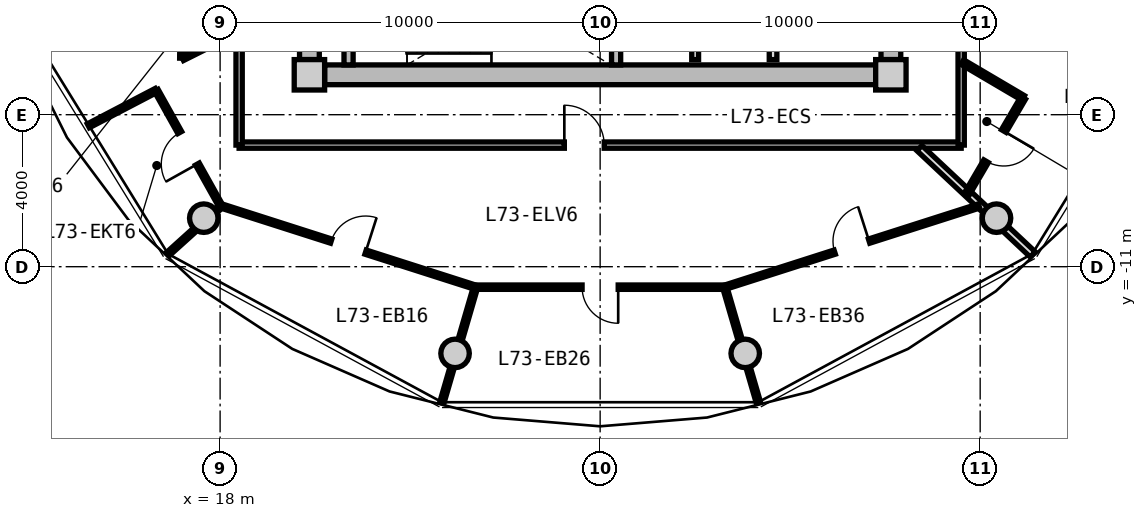
"""IFC4 building model, lengths in metres.
Left out: names, types, materials, properties, quantities, classifications, styles, units other than length and angle.
Written with IfcOpenShell. Run it as: python <this file> out.ifc"""

import sys

from ifc_helpers import new_model, si_unit, direction, frame, frame_2d, origin, origin_2d, place, context, subcontext, project, spatial, rectangle, circle, extrude, source, transform, mapped, element, fill, save


model = new_model("IFC4")
c1 = context("Model", 3, precision=1e-05, world=origin(), true_north=direction((0.0, 1.0)))
c2 = subcontext(c1, "Body", "Model", "MODEL_VIEW")
j1 = project(units=[si_unit("LENGTHUNIT", "METRE"), si_unit("PLANEANGLEUNIT", "RADIAN")], contexts=[c1])
p1 = place(None, origin())
s1 = spatial("IfcSite", under=j1, at=p1, CompositionType="ELEMENT")
p2 = place(p1, origin())
s2 = spatial("IfcBuilding", under=s1, at=p2, CompositionType="ELEMENT")
p3 = place(p2, frame((0.0, 0.0, 235.25)))
s3 = spatial("IfcBuildingStorey", under=s2, at=p3, CompositionType="ELEMENT", Elevation=235.25)
m1 = source(origin(), c2, "Body", "SweptSolid", [
    extrude(rectangle(XDim=0.8, YDim=0.8, at=origin_2d()), origin(), (0.0, 0.0, 1.0), 3.05),
])
for number, where, z_axis, x_axis in (
    (1, (20.35, -5.95, 0.0), (0.0, 0.0, 1.0), (1.0, 0.0, 0.0)),
    (2, (35.65, -5.95, 0.0), (0.0, 0.0, 1.0), (1.0, 0.0, 0.0)),
):
    element("IfcColumn", number, at=place(p3, frame(where, z_axis=z_axis, x_axis=x_axis)), inside=s3, PredefinedType="COLUMN", context=c2, shape_type="MappedRepresentation", body=[
        mapped(m1, transform((0.0, 0.0, 0.0), x_axis=(1.0, 0.0, 0.0), y_axis=(0.0, 1.0, 0.0), z_axis=(0.0, 0.0, 1.0), scale=1.0)),
    ])
m2 = source(origin(), c2, "Body", "SweptSolid", [
    extrude(rectangle(XDim=14.5, YDim=0.52, at=frame_2d((7.25, 0.0))), origin(), (0.0, 0.0, 1.0), 2.81),
])
p4 = place(p3, frame((35.25, -5.95, 0.0), z_axis=(0.0, 0.0, 1.0), x_axis=(-1.0, 0.0, 0.0)))
e3 = element("IfcWall", 3, at=p4, inside=s3, PredefinedType="SHEAR", context=c2, shape_type="MappedRepresentation", body=[
    mapped(m2, transform((0.0, 0.0, 0.0), x_axis=(1.0, 0.0, 0.0), y_axis=(0.0, 1.0, 0.0), z_axis=(0.0, 0.0, 1.0), scale=1.0)),
])
m3 = source(origin(), c2, "Body", "SweptSolid", [
    extrude(rectangle(XDim=11.1, YDim=0.52, at=frame_2d((5.55, 0.0))), origin(), (0.0, 0.0, 1.0), 2.81),
])
p5 = place(p3, frame((20.35, -5.55, 0.0), z_axis=(0.0, 0.0, 1.0), x_axis=(0.0, 1.0, 0.0)))
e4 = element("IfcWall", 4, at=p5, inside=s3, PredefinedType="SHEAR", context=c2, shape_type="MappedRepresentation", body=[
    mapped(m3, transform((0.0, 0.0, 0.0), x_axis=(1.0, 0.0, 0.0), y_axis=(0.0, 1.0, 0.0), z_axis=(0.0, 0.0, 1.0), scale=1.0)),
])
p6 = place(p5, frame((3.8, 0.0, 0.0)))
e5 = element("IfcOpeningElement", 5, at=p6, cuts=e4, PredefinedType="OPENING", context=c2, shape_type="SweptSolid", body=[
    extrude(rectangle(XDim=1.2, YDim=2.15, at=frame_2d((0.6, 1.075))), frame((0.0, 0.27, 0.0), z_axis=(0.0, -1.0, 0.0), x_axis=(1.0, 0.0, 0.0)), (0.0, 0.0, 1.0), 0.54),
])
p7 = place(p3, frame((35.65, 5.55, 0.0), z_axis=(0.0, 0.0, 1.0), x_axis=(0.0, -1.0, 0.0)))
e6 = element("IfcWall", 6, at=p7, inside=s3, PredefinedType="SHEAR", context=c2, shape_type="MappedRepresentation", body=[
    mapped(m3, transform((0.0, 0.0, 0.0), x_axis=(1.0, 0.0, 0.0), y_axis=(0.0, 1.0, 0.0), z_axis=(0.0, 0.0, 1.0), scale=1.0)),
])
p8 = place(p7, frame((5.65, 0.0, 0.0)))
e7 = element("IfcOpeningElement", 7, at=p8, cuts=e6, PredefinedType="OPENING", context=c2, shape_type="SweptSolid", body=[
    extrude(rectangle(XDim=1.2, YDim=2.15, at=frame_2d((0.6, 1.075))), frame((0.0, 0.27, 0.0), z_axis=(0.0, -1.0, 0.0), x_axis=(1.0, 0.0, 0.0)), (0.0, 0.0, 1.0), 0.54),
])
m4 = source(origin(), c2, "Body", "SweptSolid", [
    extrude(circle(Radius=0.375, at=origin_2d()), origin(), (0.0, 0.0, 1.0), 3.05),
])
for number, where, z_axis, x_axis in (
    (8, (17.57, -9.723, 0.0), (0.0, 0.0, 1.0), (1.0, 0.0, 0.0)),
    (9, (24.182, -13.281, 0.0), (0.0, 0.0, 1.0), (1.0, 0.0, 0.0)),
    (10, (31.818, -13.281, 0.0), (0.0, 0.0, 1.0), (1.0, 0.0, 0.0)),
    (11, (38.43, -9.723, 0.0), (0.0, 0.0, 1.0), (1.0, 0.0, 0.0)),
):
    element("IfcColumn", number, at=place(p3, frame(where, z_axis=z_axis, x_axis=x_axis)), inside=s3, PredefinedType="COLUMN", context=c2, shape_type="MappedRepresentation", body=[
        mapped(m4, transform((0.0, 0.0, 0.0), x_axis=(1.0, 0.0, 0.0), y_axis=(0.0, 1.0, 0.0), z_axis=(0.0, 0.0, 1.0), scale=1.0)),
    ])
m5 = source(origin(), c2, "Body", "SweptSolid", [
    extrude(rectangle(XDim=3.24, YDim=0.24, at=frame_2d((1.62, 0.0))), origin(), (0.0, 0.0, 1.0), 2.81),
])
for number, where, z_axis, x_axis in (
    (12, (21.38, -5.69, 0.0), (0.0, 0.0, 1.0), (0.0, 1.0, 0.0)),
    (13, (28.42, -5.69, 0.0), (0.0, 0.0, 1.0), (0.0, 1.0, 0.0)),
):
    element("IfcWall", number, at=place(p3, frame(where, z_axis=z_axis, x_axis=x_axis)), inside=s3, PredefinedType="PARTITIONING", context=c2, shape_type="MappedRepresentation", body=[
        mapped(m5, transform((0.0, 0.0, 0.0), x_axis=(1.0, 0.0, 0.0), y_axis=(0.0, 1.0, 0.0), z_axis=(0.0, 0.0, 1.0), scale=1.0)),
    ])
m6 = source(origin(), c2, "Body", "SweptSolid", [
    extrude(rectangle(XDim=3.8, YDim=0.2, at=frame_2d((1.9, 0.0))), origin(), (0.0, 0.0, 1.0), 2.795),
])
p9 = place(p3, frame((32.55, -5.55, 0.0), z_axis=(0.0, 0.0, 1.0), x_axis=(0.0, 1.0, 0.0)))
e14 = element("IfcWall", 14, at=p9, inside=s3, PredefinedType="PARTITIONING", context=c2, shape_type="MappedRepresentation", body=[
    mapped(m6, transform((0.0, 0.0, 0.0), x_axis=(1.0, 0.0, 0.0), y_axis=(0.0, 1.0, 0.0), z_axis=(0.0, 0.0, 1.0), scale=1.0)),
])
m7 = source(origin(), c2, "Body", "SweptSolid", [
    extrude(rectangle(XDim=4.2, YDim=0.18, at=frame_2d((2.1, 0.0))), origin(), (0.0, 0.0, 1.0), 2.795),
])
p10 = place(p3, frame((30.5, -5.55, 0.0), z_axis=(0.0, 0.0, 1.0), x_axis=(0.0, 1.0, 0.0)))
e15 = element("IfcWall", 15, at=p10, inside=s3, PredefinedType="PARTITIONING", context=c2, shape_type="MappedRepresentation", body=[
    mapped(m7, transform((0.0, 0.0, 0.0), x_axis=(1.0, 0.0, 0.0), y_axis=(0.0, 1.0, 0.0), z_axis=(0.0, 0.0, 1.0), scale=1.0)),
])
m8 = source(origin(), c2, "Body", "SweptSolid", [
    extrude(rectangle(XDim=19.0, YDim=0.165, at=frame_2d((9.5, 0.0))), origin(), (0.0, 0.0, 1.0), 2.795),
])
p11 = place(p3, frame((37.5, -7.8, 0.0), z_axis=(0.0, 0.0, 1.0), x_axis=(-1.0, 0.0, 0.0)))
e16 = element("IfcWall", 16, at=p11, inside=s3, PredefinedType="PARTITIONING", context=c2, shape_type="MappedRepresentation", body=[
    mapped(m8, transform((0.0, 0.0, 0.0), x_axis=(1.0, 0.0, 0.0), y_axis=(0.0, 1.0, 0.0), z_axis=(0.0, 0.0, 1.0), scale=1.0)),
])
p12 = place(p11, frame((9.392, 0.0, 0.0)))
e17 = element("IfcOpeningElement", 17, at=p12, cuts=e16, PredefinedType="OPENING", context=c2, shape_type="SweptSolid", body=[
    extrude(rectangle(XDim=1.05, YDim=2.15, at=frame_2d((0.525, 1.075))), frame((0.0, 0.093, 0.0), z_axis=(0.0, -1.0, 0.0), x_axis=(1.0, 0.0, 0.0)), (0.0, 0.0, 1.0), 0.185),
])
m9 = source(origin(), c2, "Body", "SweptSolid", [
    extrude(rectangle(XDim=6.88, YDim=0.165, at=frame_2d((3.44, 0.0))), origin(), (0.0, 0.0, 1.0), 2.795),
])
p13 = place(p3, frame((18.5, -7.8, 0.0), z_axis=(0.0, 0.0, 1.0), x_axis=(0.0, 1.0, 0.0)))
e18 = element("IfcWall", 18, at=p13, inside=s3, PredefinedType="PARTITIONING", context=c2, shape_type="MappedRepresentation", body=[
    mapped(m9, transform((0.0, 0.0, 0.0), x_axis=(1.0, 0.0, 0.0), y_axis=(0.0, 1.0, 0.0), z_axis=(0.0, 0.0, 1.0), scale=1.0)),
])
p14 = place(p3, frame((37.5, -0.92, 0.0), z_axis=(0.0, 0.0, 1.0), x_axis=(0.0, -1.0, 0.0)))
e19 = element("IfcWall", 19, at=p14, inside=s3, PredefinedType="PARTITIONING", context=c2, shape_type="MappedRepresentation", body=[
    mapped(m9, transform((0.0, 0.0, 0.0), x_axis=(1.0, 0.0, 0.0), y_axis=(0.0, 1.0, 0.0), z_axis=(0.0, 0.0, 1.0), scale=1.0)),
])
p15 = place(p14, frame((2.586, 0.0, 0.0)))
e20 = element("IfcOpeningElement", 20, at=p15, cuts=e19, PredefinedType="OPENING", context=c2, shape_type="SweptSolid", body=[
    extrude(rectangle(XDim=1.05, YDim=2.15, at=frame_2d((0.525, 1.075))), frame((0.0, 0.093, 0.0), z_axis=(0.0, -1.0, 0.0), x_axis=(1.0, 0.0, 0.0)), (0.0, 0.0, 1.0), 0.185),
])
m10 = source(origin(), c2, "Body", "SweptSolid", [
    extrude(rectangle(XDim=4.089, YDim=0.19, at=frame_2d((2.044, 0.0))), origin(), (0.0, 0.0, 1.0), 2.395),
])
p16 = place(p3, frame((36.402, -7.88, 0.0), z_axis=(0.0, 0.0, 1.0), x_axis=(0.729401273609, -0.684086092577, 0.0)))
e21 = element("IfcWall", 21, at=p16, inside=s3, PredefinedType="PARTITIONING", context=c2, shape_type="MappedRepresentation", body=[
    mapped(m10, transform((0.0, 0.0, 0.0), x_axis=(1.0, 0.0, 0.0), y_axis=(0.0, 1.0, 0.0), z_axis=(0.0, 0.0, 1.0), scale=1.0)),
])
m11 = source(origin(), c2, "Body", "SweptSolid", [
    extrude(rectangle(XDim=7.024, YDim=0.115, at=frame_2d((3.512, 0.0))), origin(), (0.0, 0.0, 1.0), 2.795),
])
p17 = place(p3, frame((18.03, -9.401, 0.0), z_axis=(0.0, 0.0, 1.0), x_axis=(0.952454006655, -0.304682400552, 0.0)))
e22 = element("IfcWall", 22, at=p17, inside=s3, PredefinedType="PARTITIONING", context=c2, shape_type="MappedRepresentation", body=[
    mapped(m11, transform((0.0, 0.0, 0.0), x_axis=(1.0, 0.0, 0.0), y_axis=(0.0, 1.0, 0.0), z_axis=(0.0, 0.0, 1.0), scale=1.0)),
])
p18 = place(p17, frame((3.037, 0.0, 0.0)))
e23 = element("IfcOpeningElement", 23, at=p18, cuts=e22, PredefinedType="OPENING", context=c2, shape_type="SweptSolid", body=[
    extrude(rectangle(XDim=0.95, YDim=2.1, at=frame_2d((0.475, 1.05))), frame((0.0, 0.067, 0.0), z_axis=(0.0, -1.0, 0.0), x_axis=(1.0, 0.0, 0.0)), (0.0, 0.0, 1.0), 0.135),
])
m12 = source(origin(), c2, "Body", "SweptSolid", [
    extrude(rectangle(XDim=1.905, YDim=0.115, at=frame_2d((0.953, 0.0))), origin(), (0.0, 0.0, 1.0), 2.395),
])
p19 = place(p3, frame((18.03, -9.401, 0.0), z_axis=(0.0, 0.0, 1.0), x_axis=(-0.742624708137, -0.669707804094, 0.0)))
e24 = element("IfcWall", 24, at=p19, inside=s3, PredefinedType="PARTITIONING", context=c2, shape_type="MappedRepresentation", body=[
    mapped(m12, transform((0.0, 0.0, 0.0), x_axis=(1.0, 0.0, 0.0), y_axis=(0.0, 1.0, 0.0), z_axis=(0.0, 0.0, 1.0), scale=1.0)),
])
m13 = source(origin(), c2, "Body", "SweptSolid", [
    extrude(rectangle(XDim=6.558, YDim=0.115, at=frame_2d((3.279, 0.0))), origin(), (0.0, 0.0, 1.0), 2.795),
])
p20 = place(p3, frame((24.721, -11.539, 0.0), z_axis=(0.0, 0.0, 1.0), x_axis=(1.0, 0.0, 0.0)))
e25 = element("IfcWall", 25, at=p20, inside=s3, PredefinedType="PARTITIONING", context=c2, shape_type="MappedRepresentation", body=[
    mapped(m13, transform((0.0, 0.0, 0.0), x_axis=(1.0, 0.0, 0.0), y_axis=(0.0, 1.0, 0.0), z_axis=(0.0, 0.0, 1.0), scale=1.0)),
])
p21 = place(p20, frame((2.804, 0.0, 0.0)))
e26 = element("IfcOpeningElement", 26, at=p21, cuts=e25, PredefinedType="OPENING", context=c2, shape_type="SweptSolid", body=[
    extrude(rectangle(XDim=0.95, YDim=2.1, at=frame_2d((0.475, 1.05))), frame((0.0, 0.067, 0.0), z_axis=(0.0, -1.0, 0.0), x_axis=(1.0, 0.0, 0.0)), (0.0, 0.0, 1.0), 0.135),
])
m14 = source(origin(), c2, "Body", "SweptSolid", [
    extrude(rectangle(XDim=3.173, YDim=0.115, at=frame_2d((1.587, 0.0))), origin(), (0.0, 0.0, 1.0), 2.395),
])
p22 = place(p3, frame((24.721, -11.539, 0.0), z_axis=(0.0, 0.0, 1.0), x_axis=(-0.279878875918, -0.960035319566, 0.0)))
e27 = element("IfcWall", 27, at=p22, inside=s3, PredefinedType="PARTITIONING", context=c2, shape_type="MappedRepresentation", body=[
    mapped(m14, transform((0.0, 0.0, 0.0), x_axis=(1.0, 0.0, 0.0), y_axis=(0.0, 1.0, 0.0), z_axis=(0.0, 0.0, 1.0), scale=1.0)),
])
p23 = place(p3, frame((31.28, -11.542, 0.0), z_axis=(0.0, 0.0, 1.0), x_axis=(0.952454006655, 0.304682400552, 0.0)))
e28 = element("IfcWall", 28, at=p23, inside=s3, PredefinedType="PARTITIONING", context=c2, shape_type="MappedRepresentation", body=[
    mapped(m11, transform((0.0, 0.0, 0.0), x_axis=(1.0, 0.0, 0.0), y_axis=(0.0, 1.0, 0.0), z_axis=(0.0, 0.0, 1.0), scale=1.0)),
])
p24 = place(p23, frame((3.037, 0.0, 0.0)))
e29 = element("IfcOpeningElement", 29, at=p24, cuts=e28, PredefinedType="OPENING", context=c2, shape_type="SweptSolid", body=[
    extrude(rectangle(XDim=0.95, YDim=2.1, at=frame_2d((0.475, 1.05))), frame((0.0, 0.067, 0.0), z_axis=(0.0, -1.0, 0.0), x_axis=(1.0, 0.0, 0.0)), (0.0, 0.0, 1.0), 0.135),
])
m15 = source(origin(), c2, "Body", "SweptSolid", [
    extrude(rectangle(XDim=3.171, YDim=0.115, at=frame_2d((1.585, 0.0))), origin(), (0.0, 0.0, 1.0), 2.395),
])
p25 = place(p3, frame((31.28, -11.542, 0.0), z_axis=(0.0, 0.0, 1.0), x_axis=(0.279893554029, -0.960031040338, 0.0)))
e30 = element("IfcWall", 30, at=p25, inside=s3, PredefinedType="PARTITIONING", context=c2, shape_type="MappedRepresentation", body=[
    mapped(m15, transform((0.0, 0.0, 0.0), x_axis=(1.0, 0.0, 0.0), y_axis=(0.0, 1.0, 0.0), z_axis=(0.0, 0.0, 1.0), scale=1.0)),
])
m16 = source(origin(), c2, "Body", "SweptSolid", [
    extrude(rectangle(XDim=1.638, YDim=0.14, at=frame_2d((0.819, 0.0))), origin(), (0.0, 0.0, 1.0), 2.795),
])
p26 = place(p3, frame((18.47, -4.778, 0.0), z_axis=(0.0, 0.0, 1.0), x_axis=(-0.893919977945, -0.448226586707, 0.0)))
e31 = element("IfcWall", 31, at=p26, inside=s3, PredefinedType="PARTITIONING", context=c2, shape_type="MappedRepresentation", body=[
    mapped(m16, transform((0.0, 0.0, 0.0), x_axis=(1.0, 0.0, 0.0), y_axis=(0.0, 1.0, 0.0), z_axis=(0.0, 0.0, 1.0), scale=1.0)),
])
m17 = source(origin(), c2, "Body", "SweptSolid", [
    extrude(rectangle(XDim=2.759, YDim=0.14, at=frame_2d((1.379, 0.0))), origin(), (0.0, 0.0, 1.0), 2.795),
])
p27 = place(p3, frame((17.005, -5.513, 0.0), z_axis=(0.0, 0.0, 1.0), x_axis=(0.01194710728, 0.999928630767, 0.0)))
e32 = element("IfcWall", 32, at=p27, inside=s3, PredefinedType="PARTITIONING", context=c2, shape_type="MappedRepresentation", body=[
    mapped(m17, transform((0.0, 0.0, 0.0), x_axis=(1.0, 0.0, 0.0), y_axis=(0.0, 1.0, 0.0), z_axis=(0.0, 0.0, 1.0), scale=1.0)),
])
p28 = place(p27, frame((0.919, 0.0, 0.0)))
e33 = element("IfcOpeningElement", 33, at=p28, cuts=e32, PredefinedType="OPENING", context=c2, shape_type="SweptSolid", body=[
    extrude(rectangle(XDim=0.92, YDim=2.1, at=frame_2d((0.46, 1.05))), frame((0.0, 0.08, 0.0), z_axis=(0.0, -1.0, 0.0), x_axis=(1.0, 0.0, 0.0)), (0.0, 0.0, 1.0), 0.16),
])
m18 = source(origin(), c2, "Body", "SweptSolid", [
    extrude(rectangle(XDim=2.015, YDim=0.115, at=frame_2d((1.007, 0.0))), origin(), (0.0, 0.0, 1.0), 2.795),
])
p29 = place(p3, frame((16.318, -6.36, 0.0), z_axis=(0.0, 0.0, 1.0), x_axis=(-0.886437892009, -0.462847559797, 0.0)))
e34 = element("IfcWall", 34, at=p29, inside=s3, PredefinedType="PARTITIONING", context=c2, shape_type="MappedRepresentation", body=[
    mapped(m18, transform((0.0, 0.0, 0.0), x_axis=(1.0, 0.0, 0.0), y_axis=(0.0, 1.0, 0.0), z_axis=(0.0, 0.0, 1.0), scale=1.0)),
])
m19 = source(origin(), c2, "Body", "SweptSolid", [
    extrude(rectangle(XDim=3.493, YDim=0.115, at=frame_2d((1.746, 0.0))), origin(), (0.0, 0.0, 1.0), 2.795),
])
p30 = place(p3, frame((16.318, -6.36, 0.0), z_axis=(0.0, 0.0, 1.0), x_axis=(0.487896553961, -0.872901456427, 0.0)))
e35 = element("IfcWall", 35, at=p30, inside=s3, PredefinedType="PARTITIONING", context=c2, shape_type="MappedRepresentation", body=[
    mapped(m19, transform((0.0, 0.0, 0.0), x_axis=(1.0, 0.0, 0.0), y_axis=(0.0, 1.0, 0.0), z_axis=(0.0, 0.0, 1.0), scale=1.0)),
])
p31 = place(p30, frame((1.271, 0.0, 0.0)))
e36 = element("IfcOpeningElement", 36, at=p31, cuts=e35, PredefinedType="OPENING", context=c2, shape_type="SweptSolid", body=[
    extrude(rectangle(XDim=0.95, YDim=2.1, at=frame_2d((0.475, 1.05))), frame((0.0, 0.067, 0.0), z_axis=(0.0, -1.0, 0.0), x_axis=(1.0, 0.0, 0.0)), (0.0, 0.0, 1.0), 0.135),
])
m20 = source(origin(), c2, "Body", "SweptSolid", [
    extrude(rectangle(XDim=1.859, YDim=0.14, at=frame_2d((0.93, 0.0))), origin(), (0.0, 0.0, 1.0), 2.795),
])
p32 = place(p3, frame((37.53, -5.615, 0.0), z_axis=(0.0, 0.0, 1.0), x_axis=(0.861555897139, -0.507662718845, 0.0)))
e37 = element("IfcWall", 37, at=p32, inside=s3, PredefinedType="PARTITIONING", context=c2, shape_type="MappedRepresentation", body=[
    mapped(m20, transform((0.0, 0.0, 0.0), x_axis=(1.0, 0.0, 0.0), y_axis=(0.0, 1.0, 0.0), z_axis=(0.0, 0.0, 1.0), scale=1.0)),
])
m21 = source(origin(), c2, "Body", "SweptSolid", [
    extrude(rectangle(XDim=2.939, YDim=0.14, at=frame_2d((1.47, 0.0))), origin(), (0.0, 0.0, 1.0), 2.795),
])
p33 = place(p3, frame((39.132, -6.559, 0.0), z_axis=(0.0, 0.0, 1.0), x_axis=(-0.505883614636, -0.862601743821, 0.0)))
e38 = element("IfcWall", 38, at=p33, inside=s3, PredefinedType="PARTITIONING", context=c2, shape_type="MappedRepresentation", body=[
    mapped(m21, transform((0.0, 0.0, 0.0), x_axis=(1.0, 0.0, 0.0), y_axis=(0.0, 1.0, 0.0), z_axis=(0.0, 0.0, 1.0), scale=1.0)),
])
p34 = place(p33, frame((1.01, 0.0, 0.0)))
e39 = element("IfcOpeningElement", 39, at=p34, cuts=e38, PredefinedType="OPENING", context=c2, shape_type="SweptSolid", body=[
    extrude(rectangle(XDim=0.92, YDim=2.1, at=frame_2d((0.46, 1.05))), frame((0.0, 0.08, 0.0), z_axis=(0.0, -1.0, 0.0), x_axis=(1.0, 0.0, 0.0)), (0.0, 0.0, 1.0), 0.16),
])
m22 = source(origin(), c2, "Body", "SweptSolid", [
    extrude(rectangle(XDim=1.05, YDim=2.15, at=frame_2d((0.525, 1.075))), frame((0.0, 0.025, 0.0), z_axis=(0.0, -1.0, 0.0), x_axis=(1.0, 0.0, 0.0)), (0.0, 0.0, 1.0), 0.05),
])
p35 = place(p12, frame((1.05, 0.0, 0.0), z_axis=(0.0, 0.0, 1.0), x_axis=(-1.0, 0.0, 0.0)))
e40 = element("IfcDoor", 40, at=p35, inside=s3, OperationType="SINGLE_SWING_LEFT", PredefinedType="DOOR", context=c2, shape_type="MappedRepresentation", body=[
    mapped(m22, transform((0.0, 0.0, 0.0), x_axis=(1.0, 0.0, 0.0), y_axis=(0.0, 1.0, 0.0), z_axis=(0.0, 0.0, 1.0), scale=1.0)),
])
fill(e17, e40)
m23 = source(origin(), c2, "Body", "SweptSolid", [
    extrude(rectangle(XDim=0.95, YDim=2.1, at=frame_2d((0.475, 1.05))), frame((0.0, 0.025, 0.0), z_axis=(0.0, -1.0, 0.0), x_axis=(1.0, 0.0, 0.0)), (0.0, 0.0, 1.0), 0.05),
])
p36 = place(p31, frame((0.95, 0.0, 0.0), z_axis=(0.0, 0.0, 1.0), x_axis=(-1.0, 0.0, 0.0)))
e41 = element("IfcDoor", 41, at=p36, inside=s3, OperationType="SINGLE_SWING_LEFT", PredefinedType="DOOR", context=c2, shape_type="MappedRepresentation", body=[
    mapped(m23, transform((0.0, 0.0, 0.0), x_axis=(1.0, 0.0, 0.0), y_axis=(0.0, 1.0, 0.0), z_axis=(0.0, 0.0, 1.0), scale=1.0)),
])
fill(e36, e41)
p37 = place(p18, origin())
e42 = element("IfcDoor", 42, at=p37, inside=s3, OperationType="SINGLE_SWING_RIGHT", PredefinedType="DOOR", context=c2, shape_type="MappedRepresentation", body=[
    mapped(m23, transform((0.0, 0.0, 0.0), x_axis=(1.0, 0.0, 0.0), y_axis=(0.0, 1.0, 0.0), z_axis=(0.0, 0.0, 1.0), scale=1.0)),
])
fill(e23, e42)
p38 = place(p21, frame((0.95, 0.0, 0.0), z_axis=(0.0, 0.0, 1.0), x_axis=(-1.0, 0.0, 0.0)))
e43 = element("IfcDoor", 43, at=p38, inside=s3, OperationType="SINGLE_SWING_LEFT", PredefinedType="DOOR", context=c2, shape_type="MappedRepresentation", body=[
    mapped(m23, transform((0.0, 0.0, 0.0), x_axis=(1.0, 0.0, 0.0), y_axis=(0.0, 1.0, 0.0), z_axis=(0.0, 0.0, 1.0), scale=1.0)),
])
fill(e26, e43)
p39 = place(p24, origin())
e44 = element("IfcDoor", 44, at=p39, inside=s3, OperationType="SINGLE_SWING_RIGHT", PredefinedType="DOOR", context=c2, shape_type="MappedRepresentation", body=[
    mapped(m23, transform((0.0, 0.0, 0.0), x_axis=(1.0, 0.0, 0.0), y_axis=(0.0, 1.0, 0.0), z_axis=(0.0, 0.0, 1.0), scale=1.0)),
])
fill(e29, e44)
m24 = source(origin(), c2, "Body", "SweptSolid", [
    extrude(rectangle(XDim=0.92, YDim=2.1, at=frame_2d((0.46, 1.05))), frame((0.0, 0.025, 0.0), z_axis=(0.0, -1.0, 0.0), x_axis=(1.0, 0.0, 0.0)), (0.0, 0.0, 1.0), 0.05),
])
p40 = place(p34, origin())
e45 = element("IfcDoor", 45, at=p40, inside=s3, OperationType="SINGLE_SWING_LEFT", PredefinedType="DOOR", context=c2, shape_type="MappedRepresentation", body=[
    mapped(m24, transform((0.0, 0.0, 0.0), x_axis=(1.0, 0.0, 0.0), y_axis=(0.0, 1.0, 0.0), z_axis=(0.0, 0.0, 1.0), scale=1.0)),
])
fill(e39, e45)
save(model, sys.argv[1])
